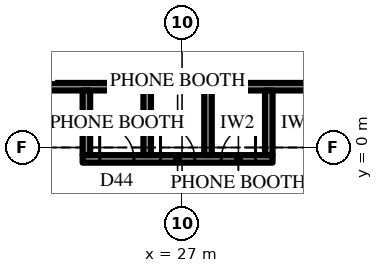
"""IFC4 building model, lengths in metres.
Left out: names, types, materials, properties, quantities, classifications, styles, units other than length and angle.
Written with IfcOpenShell. Run it as: python <this file> out.ifc"""

import sys

from ifc_helpers import new_model, si_unit, direction, frame, frame_2d, origin, place, context, subcontext, project, spatial, rectangle, extrude, element, fill, save


model = new_model("IFC4")
c1 = context("Model", 3, precision=1e-05, world=origin(), true_north=direction((0.0, 1.0)))
c2 = subcontext(c1, "Body", "Model", "MODEL_VIEW")
j1 = project(units=[si_unit("LENGTHUNIT", "METRE"), si_unit("PLANEANGLEUNIT", "RADIAN")], contexts=[c1])
p1 = place(None, origin())
s1 = spatial("IfcSite", under=j1, at=p1, CompositionType="ELEMENT")
p2 = place(p1, origin())
s2 = spatial("IfcBuilding", under=s1, at=p2, CompositionType="ELEMENT")
p3 = place(p2, frame((0.0, 0.0, 169.9)))
s3 = spatial("IfcBuildingStorey", under=s2, at=p3, CompositionType="ELEMENT", Elevation=169.9)
p4 = place(p3, frame((18.6, 1.6, 0.0), z_axis=(0.0, 0.0, 1.0), x_axis=(1.0, 0.0, 0.0)))
e1 = element("IfcWall", 1, at=p4, inside=s3, PredefinedType="PARTITIONING", context=c2, shape_type="SweptSolid", body=[
    extrude(rectangle(XDim=15.059, YDim=0.2, at=frame_2d((7.53, 0.0))), origin(), (0.0, 0.0, 1.0), 4.0),
])
p5 = place(p4, frame((1.006, 0.0, 0.0)))
e2 = element("IfcOpeningElement", 2, at=p5, cuts=e1, PredefinedType="OPENING", context=c2, shape_type="SweptSolid", body=[
    extrude(rectangle(XDim=1.0, YDim=2.2, at=frame_2d((0.5, 1.1))), frame((0.0, 0.11, 0.0), z_axis=(0.0, -1.0, 0.0), x_axis=(1.0, 0.0, 0.0)), (0.0, 0.0, 1.0), 0.22),
])
p6 = place(p3, frame((24.383, -0.3, 0.0), z_axis=(0.0, 0.0, 1.0), x_axis=(1.0, 0.0, 0.0)))
e3 = element("IfcWall", 3, at=p6, inside=s3, PredefinedType="PARTITIONING", context=c2, shape_type="SweptSolid", body=[
    extrude(rectangle(XDim=5.0, YDim=0.2, at=frame_2d((2.5, 0.0))), origin(), (0.0, 0.0, 1.0), 4.0),
])
p7 = place(p6, frame((0.45, 0.0, 0.0)))
e4 = element("IfcOpeningElement", 4, at=p7, cuts=e3, PredefinedType="OPENING", context=c2, shape_type="SweptSolid", body=[
    extrude(rectangle(XDim=0.9, YDim=2.2, at=frame_2d((0.45, 1.1))), frame((0.0, 0.11, 0.0), z_axis=(0.0, -1.0, 0.0), x_axis=(1.0, 0.0, 0.0)), (0.0, 0.0, 1.0), 0.22),
])
p8 = place(p6, frame((2.05, 0.0, 0.0)))
e5 = element("IfcOpeningElement", 5, at=p8, cuts=e3, PredefinedType="OPENING", context=c2, shape_type="SweptSolid", body=[
    extrude(rectangle(XDim=0.9, YDim=2.2, at=frame_2d((0.45, 1.1))), frame((0.0, 0.11, 0.0), z_axis=(0.0, -1.0, 0.0), x_axis=(1.0, 0.0, 0.0)), (0.0, 0.0, 1.0), 0.22),
])
p9 = place(p6, frame((3.65, 0.0, 0.0)))
e6 = element("IfcOpeningElement", 6, at=p9, cuts=e3, PredefinedType="OPENING", context=c2, shape_type="SweptSolid", body=[
    extrude(rectangle(XDim=0.9, YDim=2.2, at=frame_2d((0.45, 1.1))), frame((0.0, 0.11, 0.0), z_axis=(0.0, -1.0, 0.0), x_axis=(1.0, 0.0, 0.0)), (0.0, 0.0, 1.0), 0.22),
])
for number, where, z_axis, x_axis in (
    (7, (24.483, 1.5, 0.0), (0.0, 0.0, 1.0), (0.0, -1.0, 0.0)),
    (8, (26.083, 1.5, 0.0), (0.0, 0.0, 1.0), (0.0, -1.0, 0.0)),
    (9, (27.683, 1.5, 0.0), (0.0, 0.0, 1.0), (0.0, -1.0, 0.0)),
    (10, (29.283, 1.5, 0.0), (0.0, 0.0, 1.0), (0.0, -1.0, 0.0)),
):
    element("IfcWall", number, at=place(p3, frame(where, z_axis=z_axis, x_axis=x_axis)), inside=s3, PredefinedType="PARTITIONING", context=c2, shape_type="SweptSolid", body=[
        extrude(rectangle(XDim=1.7, YDim=0.2, at=frame_2d((0.85, 0.0))), origin(), (0.0, 0.0, 1.0), 4.0),
    ])
p10 = place(p7, origin())
e11 = element("IfcDoor", 11, at=p10, inside=s3, OperationType="SINGLE_SWING_RIGHT", PredefinedType="DOOR", context=c2, shape_type="SweptSolid", body=[
    extrude(rectangle(XDim=0.9, YDim=2.2, at=frame_2d((0.45, 1.1))), frame((0.0, 0.025, 0.0), z_axis=(0.0, -1.0, 0.0), x_axis=(1.0, 0.0, 0.0)), (0.0, 0.0, 1.0), 0.05),
])
fill(e4, e11)
p11 = place(p8, origin())
e12 = element("IfcDoor", 12, at=p11, inside=s3, OperationType="SINGLE_SWING_RIGHT", PredefinedType="DOOR", context=c2, shape_type="SweptSolid", body=[
    extrude(rectangle(XDim=0.9, YDim=2.2, at=frame_2d((0.45, 1.1))), frame((0.0, 0.025, 0.0), z_axis=(0.0, -1.0, 0.0), x_axis=(1.0, 0.0, 0.0)), (0.0, 0.0, 1.0), 0.05),
])
fill(e5, e12)
p12 = place(p9, origin())
e13 = element("IfcDoor", 13, at=p12, inside=s3, OperationType="SINGLE_SWING_LEFT", PredefinedType="DOOR", context=c2, shape_type="SweptSolid", body=[
    extrude(rectangle(XDim=0.9, YDim=2.2, at=frame_2d((0.45, 1.1))), frame((0.0, 0.025, 0.0), z_axis=(0.0, -1.0, 0.0), x_axis=(1.0, 0.0, 0.0)), (0.0, 0.0, 1.0), 0.05),
])
fill(e6, e13)
save(model, sys.argv[1])
